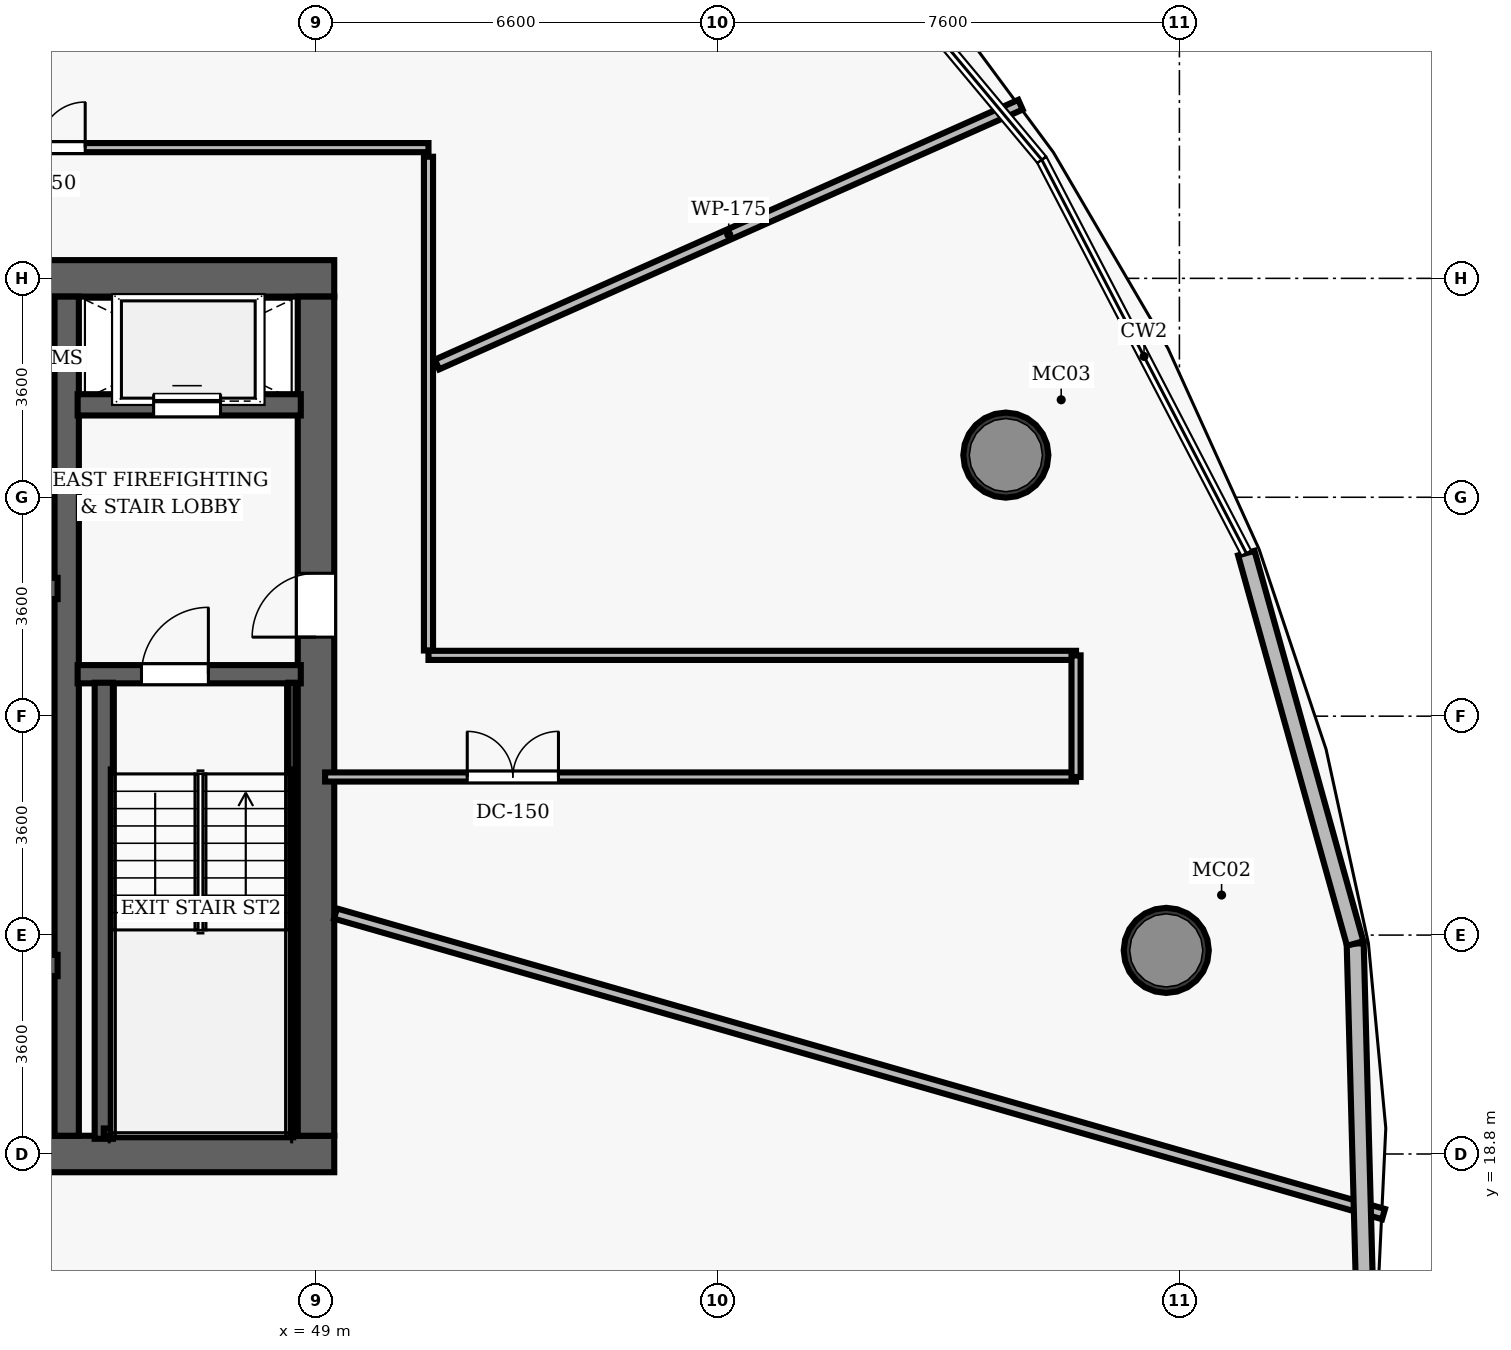
"""IFC4 building model, lengths in metres.
Left out: names, types, materials, properties, quantities, classifications, styles, units other than length and angle.
Written with IfcOpenShell. Run it as: python <this file> out.ifc"""

import sys

from ifc_helpers import new_model, si_unit, direction, frame, frame_2d, origin, origin_2d, place, context, subcontext, project, spatial, rectangle, hollow_circle, extrude, element, fill, save


model = new_model("IFC4")
c1 = context("Model", 3, precision=1e-05, world=origin(), true_north=direction((0.0, 1.0)))
c2 = subcontext(c1, "Body", "Model", "MODEL_VIEW")
j1 = project(units=[si_unit("LENGTHUNIT", "METRE"), si_unit("PLANEANGLEUNIT", "RADIAN")], contexts=[c1])
p1 = place(None, origin())
s1 = spatial("IfcSite", under=j1, at=p1, CompositionType="ELEMENT")
p2 = place(p1, origin())
s2 = spatial("IfcBuilding", under=s1, at=p2, CompositionType="ELEMENT")
p3 = place(p2, frame((0.0, 0.0, 144.8)))
s3 = spatial("IfcBuildingStorey", under=s2, at=p3, CompositionType="ELEMENT", Elevation=144.8)
p4 = place(p3, frame((26.7, 18.8, 0.0), z_axis=(0.0, 0.0, 1.0), x_axis=(1.0, 0.0, 0.0)))
e1 = element("IfcWall", 1, at=p4, inside=s3, PredefinedType="SHEAR", context=c2, shape_type="SweptSolid", body=[
    extrude(rectangle(XDim=22.6, YDim=0.6, at=frame_2d((11.3, 0.0))), origin(), (0.0, 0.0, 1.0), 3.5),
])
p5 = place(p4, frame((14.52, 0.0, 0.0)))
e2 = element("IfcOpeningElement", 2, at=p5, cuts=e1, PredefinedType="OPENING", context=c2, shape_type="SweptSolid", body=[
    extrude(rectangle(XDim=1.05, YDim=2.15, at=frame_2d((0.525, 1.075))), frame((0.0, 0.31, 0.0), z_axis=(0.0, -1.0, 0.0), x_axis=(1.0, 0.0, 0.0)), (0.0, 0.0, 1.0), 0.62),
])
p6 = place(p3, frame((26.7, 33.2, 0.0), z_axis=(0.0, 0.0, 1.0), x_axis=(1.0, 0.0, 0.0)))
e3 = element("IfcWall", 3, at=p6, inside=s3, PredefinedType="SHEAR", context=c2, shape_type="SweptSolid", body=[
    extrude(rectangle(XDim=22.6, YDim=0.6, at=frame_2d((11.3, 0.0))), origin(), (0.0, 0.0, 1.0), 3.5),
])
p7 = place(p6, frame((4.62, 0.0, 0.0)))
e4 = element("IfcOpeningElement", 4, at=p7, cuts=e3, PredefinedType="OPENING", context=c2, shape_type="SweptSolid", body=[
    extrude(rectangle(XDim=1.05, YDim=2.15, at=frame_2d((0.525, 1.075))), frame((0.0, 0.31, 0.0), z_axis=(0.0, -1.0, 0.0), x_axis=(1.0, 0.0, 0.0)), (0.0, 0.0, 1.0), 0.62),
])
p8 = place(p6, frame((14.52, 0.0, 0.0)))
e5 = element("IfcOpeningElement", 5, at=p8, cuts=e3, PredefinedType="OPENING", context=c2, shape_type="SweptSolid", body=[
    extrude(rectangle(XDim=1.05, YDim=2.15, at=frame_2d((0.525, 1.075))), frame((0.0, 0.31, 0.0), z_axis=(0.0, -1.0, 0.0), x_axis=(1.0, 0.0, 0.0)), (0.0, 0.0, 1.0), 0.62),
])
p9 = place(p3, frame((49.0, 19.1, 0.0), z_axis=(0.0, 0.0, 1.0), x_axis=(0.0, 1.0, 0.0)))
e6 = element("IfcWall", 6, at=p9, inside=s3, PredefinedType="SHEAR", context=c2, shape_type="SweptSolid", body=[
    extrude(rectangle(XDim=13.8, YDim=0.6, at=frame_2d((6.9, 0.0))), origin(), (0.0, 0.0, 1.0), 3.5),
])
p10 = place(p9, frame((8.2, 0.0, 0.0)))
e7 = element("IfcOpeningElement", 7, at=p10, cuts=e6, PredefinedType="OPENING", context=c2, shape_type="SweptSolid", body=[
    extrude(rectangle(XDim=1.05, YDim=2.15, at=frame_2d((0.525, 1.075))), frame((0.0, 0.31, 0.0), z_axis=(0.0, -1.0, 0.0), x_axis=(1.0, 0.0, 0.0)), (0.0, 0.0, 1.0), 0.62),
])
p11 = place(p3, frame((44.9, 19.1, 0.0), z_axis=(0.0, 0.0, 1.0), x_axis=(0.0, 1.0, 0.0)))
e8 = element("IfcWall", 8, at=p11, inside=s3, PredefinedType="SHEAR", context=c2, shape_type="SweptSolid", body=[
    extrude(rectangle(XDim=13.8, YDim=0.4, at=frame_2d((6.9, 0.0))), origin(), (0.0, 0.0, 1.0), 3.5),
])
for number, where, z_axis, x_axis in (
    (9, (62.984, 22.148, 0.0), (0.0, 0.0, 1.0), (1.0, 0.0, 0.0)),
    (10, (60.346, 30.293, 0.0), (0.0, 0.0, 1.0), (1.0, 0.0, 0.0)),
):
    element("IfcColumn", number, at=place(p3, frame(where, z_axis=z_axis, x_axis=x_axis)), inside=s3, PredefinedType="COLUMN", context=c2, shape_type="SweptSolid", body=[
        extrude(hollow_circle(Radius=0.7, WallThickness=0.055, at=origin_2d()), origin(), (0.0, 0.0, 1.0), 3.5),
    ])
p12 = place(p3, frame((45.08, 26.69, 0.0), z_axis=(0.0, 0.0, 1.0), x_axis=(1.0, 0.0, 0.0)))
e11 = element("IfcWall", 11, at=p12, inside=s3, PredefinedType="SHEAR", context=c2, shape_type="SweptSolid", body=[
    extrude(rectangle(XDim=3.67, YDim=0.3, at=frame_2d((1.835, 0.0))), origin(), (0.0, 0.0, 1.0), 3.5),
])
p13 = place(p12, frame((1.05, 0.0, 0.0)))
e12 = element("IfcOpeningElement", 12, at=p13, cuts=e11, PredefinedType="OPENING", context=c2, shape_type="SweptSolid", body=[
    extrude(rectangle(XDim=1.1, YDim=2.15, at=frame_2d((0.55, 1.075))), frame((0.0, 0.16, 0.0), z_axis=(0.0, -1.0, 0.0), x_axis=(1.0, 0.0, 0.0)), (0.0, 0.0, 1.0), 0.32),
])
p14 = place(p3, frame((45.51, 19.05, 0.0), z_axis=(0.0, 0.0, 1.0), x_axis=(0.0, 1.0, 0.0)))
e13 = element("IfcWall", 13, at=p14, inside=s3, PredefinedType="SHEAR", context=c2, shape_type="SweptSolid", body=[
    extrude(rectangle(XDim=7.5, YDim=0.3, at=frame_2d((3.75, 0.0))), origin(), (0.0, 0.0, 1.0), 3.5),
])
p15 = place(p3, frame((48.605, 19.1, 0.0), z_axis=(0.0, 0.0, 1.0), x_axis=(0.0, 1.0, 0.0)))
e14 = element("IfcWall", 14, at=p15, inside=s3, PredefinedType="SHEAR", context=c2, shape_type="SweptSolid", body=[
    extrude(rectangle(XDim=7.45, YDim=0.12, at=frame_2d((3.725, 0.0))), origin(), (0.0, 0.0, 1.0), 3.5),
])
p16 = place(p3, frame((45.51, 19.16, 0.0), z_axis=(0.0, 0.0, 1.0), x_axis=(1.0, 0.0, 0.0)))
e15 = element("IfcWall", 15, at=p16, inside=s3, PredefinedType="SHEAR", context=c2, shape_type="SweptSolid", body=[
    extrude(rectangle(XDim=3.095, YDim=0.12, at=frame_2d((1.547, 0.0))), origin(), (0.0, 0.0, 1.0), 3.5),
])
p17 = place(p3, frame((45.08, 31.12, 0.0), z_axis=(0.0, 0.0, 1.0), x_axis=(1.0, 0.0, 0.0)))
e16 = element("IfcWall", 16, at=p17, inside=s3, PredefinedType="SHEAR", context=c2, shape_type="SweptSolid", body=[
    extrude(rectangle(XDim=3.67, YDim=0.35, at=frame_2d((1.835, 0.0))), origin(), (0.0, 0.0, 1.0), 2.675),
])
p18 = place(p17, frame((1.25, 0.0, 0.0)))
e17 = element("IfcOpeningElement", 17, at=p18, cuts=e16, PredefinedType="OPENING", context=c2, shape_type="SweptSolid", body=[
    extrude(rectangle(XDim=1.1, YDim=2.15, at=frame_2d((0.55, 1.075))), frame((0.0, 0.185, 0.0), z_axis=(0.0, -1.0, 0.0), x_axis=(1.0, 0.0, 0.0)), (0.0, 0.0, 1.0), 0.37),
])
for number, where, z_axis, x_axis in (
    (18, (42.72, 21.9, 0.0), (0.0, 0.0, 1.0), (1.0, 0.0, 0.0)),
    (19, (42.72, 28.1, 0.0), (0.0, 0.0, 1.0), (1.0, 0.0, 0.0)),
):
    element("IfcWall", number, at=place(p3, frame(where, z_axis=z_axis, x_axis=x_axis)), inside=s3, PredefinedType="SHEAR", context=c2, shape_type="SweptSolid", body=[
        extrude(rectangle(XDim=2.03, YDim=0.35, at=frame_2d((1.015, 0.0))), origin(), (0.0, 0.0, 1.0), 2.675),
    ])
p19 = place(p3, frame((24.85, 35.35, 0.0), z_axis=(0.0, 0.0, 1.0), x_axis=(1.0, 0.0, 0.0)))
e20 = element("IfcWall", 20, at=p19, inside=s3, PredefinedType="PARTITIONING", context=c2, shape_type="SweptSolid", body=[
    extrude(rectangle(XDim=26.0, YDim=0.15, at=frame_2d((13.0, 0.0))), origin(), (0.0, 0.0, 1.0), 2.675),
])
p20 = place(p19, frame((18.854, 0.0, 0.0)))
e21 = element("IfcOpeningElement", 21, at=p20, cuts=e20, PredefinedType="OPENING", context=c2, shape_type="SweptSolid", body=[
    extrude(rectangle(XDim=1.5, YDim=2.2, at=frame_2d((0.75, 1.1))), frame((0.0, 0.085, 0.0), z_axis=(0.0, -1.0, 0.0), x_axis=(1.0, 0.0, 0.0)), (0.0, 0.0, 1.0), 0.17),
])
p21 = place(p19, frame((11.636, 0.0, 0.0)))
e22 = element("IfcOpeningElement", 22, at=p21, cuts=e20, PredefinedType="OPENING", context=c2, shape_type="SweptSolid", body=[
    extrude(rectangle(XDim=1.5, YDim=2.2, at=frame_2d((0.75, 1.1))), frame((0.0, 0.085, 0.0), z_axis=(0.0, -1.0, 0.0), x_axis=(1.0, 0.0, 0.0)), (0.0, 0.0, 1.0), 0.17),
])
p22 = place(p19, frame((6.73, 0.0, 0.0)))
e23 = element("IfcOpeningElement", 23, at=p22, cuts=e20, PredefinedType="OPENING", context=c2, shape_type="SweptSolid", body=[
    extrude(rectangle(XDim=0.95, YDim=2.15, at=frame_2d((0.475, 1.075))), frame((0.0, 0.085, 0.0), z_axis=(0.0, -1.0, 0.0), x_axis=(1.0, 0.0, 0.0)), (0.0, 0.0, 1.0), 0.17),
])
p23 = place(p3, frame((50.85, 27.08, 0.0), z_axis=(0.0, 0.0, 1.0), x_axis=(0.0, 1.0, 0.0)))
e24 = element("IfcWall", 24, at=p23, inside=s3, PredefinedType="PARTITIONING", context=c2, shape_type="SweptSolid", body=[
    extrude(rectangle(XDim=8.12, YDim=0.15, at=frame_2d((4.06, 0.0))), origin(), (0.0, 0.0, 1.0), 2.675),
])
p24 = place(p3, frame((50.85, 27.0, 0.0), z_axis=(0.0, 0.0, 1.0), x_axis=(1.0, 0.0, 0.0)))
e25 = element("IfcWall", 25, at=p24, inside=s3, PredefinedType="PARTITIONING", context=c2, shape_type="SweptSolid", body=[
    extrude(rectangle(XDim=10.65, YDim=0.15, at=frame_2d((5.325, 0.0))), origin(), (0.0, 0.0, 1.0), 2.675),
])
p25 = place(p3, frame((49.15, 25.0, 0.0), z_axis=(0.0, 0.0, 1.0), x_axis=(1.0, 0.0, 0.0)))
e26 = element("IfcWall", 26, at=p25, inside=s3, PredefinedType="PARTITIONING", context=c2, shape_type="SweptSolid", body=[
    extrude(rectangle(XDim=12.35, YDim=0.15, at=frame_2d((6.175, 0.0))), origin(), (0.0, 0.0, 1.0), 2.675),
])
p26 = place(p25, frame((2.337, 0.0, 0.0)))
e27 = element("IfcOpeningElement", 27, at=p26, cuts=e26, PredefinedType="OPENING", context=c2, shape_type="SweptSolid", body=[
    extrude(rectangle(XDim=1.5, YDim=2.2, at=frame_2d((0.75, 1.1))), frame((0.0, 0.085, 0.0), z_axis=(0.0, -1.0, 0.0), x_axis=(1.0, 0.0, 0.0)), (0.0, 0.0, 1.0), 0.17),
])
p27 = place(p3, frame((61.5, 25.0, 0.0), z_axis=(0.0, 0.0, 1.0), x_axis=(0.0, 1.0, 0.0)))
e28 = element("IfcWall", 28, at=p27, inside=s3, PredefinedType="PARTITIONING", context=c2, shape_type="SweptSolid", body=[
    extrude(rectangle(XDim=2.0, YDim=0.15, at=frame_2d((1.0, 0.0))), origin(), (0.0, 0.0, 1.0), 2.675),
])
p28 = place(p3, frame((50.99, 31.783, 0.0), z_axis=(0.0, 0.0, 1.0), x_axis=(0.913539137808, 0.406750837361, 0.0)))
e29 = element("IfcWall", 29, at=p28, inside=s3, PredefinedType="PARTITIONING", context=c2, shape_type="SweptSolid", body=[
    extrude(rectangle(XDim=10.504, YDim=0.175, at=frame_2d((5.252, 0.0))), origin(), (0.0, 0.0, 1.0), 2.675),
])
p29 = place(p3, frame((42.629, 35.49, 0.0), z_axis=(0.0, 0.0, 1.0), x_axis=(0.4383698995, 0.898794654642, 0.0)))
e30 = element("IfcWall", 30, at=p29, inside=s3, PredefinedType="PARTITIONING", context=c2, shape_type="SweptSolid", body=[
    extrude(rectangle(XDim=12.354, YDim=0.175, at=frame_2d((6.177, 0.0))), origin(), (0.0, 0.0, 1.0), 2.675),
])
p30 = place(p3, frame((43.072, 18.48, 0.0), z_axis=(0.0, 0.0, 1.0), x_axis=(0.559194878042, -0.829036240687, 0.0)))
e31 = element("IfcWall", 31, at=p30, inside=s3, PredefinedType="PARTITIONING", context=c2, shape_type="SweptSolid", body=[
    extrude(rectangle(XDim=18.556, YDim=0.175, at=frame_2d((9.278, 0.0))), origin(), (0.0, 0.0, 1.0), 2.675),
])
p31 = place(p3, frame((49.32, 22.754, 0.0), z_axis=(0.0, 0.0, 1.0), x_axis=(0.961264573676, -0.275627319757, 0.0)))
e32 = element("IfcWall", 32, at=p31, inside=s3, PredefinedType="PARTITIONING", context=c2, shape_type="SweptSolid", body=[
    extrude(rectangle(XDim=17.931, YDim=0.175, at=frame_2d((8.966, 0.0))), origin(), (0.0, 0.0, 1.0), 2.675),
])
p32 = place(p3, frame((66.091, 22.261, 0.0), z_axis=(0.0, 0.0, 1.0), x_axis=(0.026918642547, -0.999637627685, 0.0)))
e33 = element("IfcWall", 33, at=p32, inside=s3, PredefinedType="SOLIDWALL", context=c2, shape_type="SweptSolid", body=[
    extrude(rectangle(XDim=5.823, YDim=0.28, at=frame_2d((2.911, 0.0))), origin(), (0.0, 0.0, 1.0), 3.26),
])
p33 = place(p3, frame((64.3, 28.681, 0.0), z_axis=(0.0, 0.0, 1.0), x_axis=(0.268682789377, -0.963228715671, 0.0)))
e34 = element("IfcWall", 34, at=p33, inside=s3, PredefinedType="SOLIDWALL", context=c2, shape_type="SweptSolid", body=[
    extrude(rectangle(XDim=6.665, YDim=0.28, at=frame_2d((3.333, 0.0))), origin(), (0.0, 0.0, 1.0), 3.26),
])
p34 = place(p13, origin())
e35 = element("IfcDoor", 35, at=p34, inside=s3, OperationType="SINGLE_SWING_RIGHT", PredefinedType="DOOR", context=c2, shape_type="SweptSolid", body=[
    extrude(rectangle(XDim=1.1, YDim=2.15, at=frame_2d((0.55, 1.075))), frame((0.0, 0.025, 0.0), z_axis=(0.0, -1.0, 0.0), x_axis=(1.0, 0.0, 0.0)), (0.0, 0.0, 1.0), 0.05),
])
fill(e12, e35)
p35 = place(p10, origin())
e36 = element("IfcDoor", 36, at=p35, inside=s3, OperationType="SINGLE_SWING_LEFT", PredefinedType="DOOR", context=c2, shape_type="SweptSolid", body=[
    extrude(rectangle(XDim=1.05, YDim=2.15, at=frame_2d((0.525, 1.075))), frame((0.0, 0.025, 0.0), z_axis=(0.0, -1.0, 0.0), x_axis=(1.0, 0.0, 0.0)), (0.0, 0.0, 1.0), 0.05),
])
fill(e7, e36)
p36 = place(p20, origin())
e37 = element("IfcDoor", 37, at=p36, inside=s3, OperationType="DOUBLE_DOOR_SINGLE_SWING", PredefinedType="DOOR", context=c2, shape_type="SweptSolid", body=[
    extrude(rectangle(XDim=1.5, YDim=2.2, at=frame_2d((0.75, 1.1))), frame((0.0, 0.025, 0.0), z_axis=(0.0, -1.0, 0.0), x_axis=(1.0, 0.0, 0.0)), (0.0, 0.0, 1.0), 0.05),
])
fill(e21, e37)
p37 = place(p26, origin())
e38 = element("IfcDoor", 38, at=p37, inside=s3, OperationType="DOUBLE_DOOR_SINGLE_SWING", PredefinedType="DOOR", context=c2, shape_type="SweptSolid", body=[
    extrude(rectangle(XDim=1.5, YDim=2.2, at=frame_2d((0.75, 1.1))), frame((0.0, 0.025, 0.0), z_axis=(0.0, -1.0, 0.0), x_axis=(1.0, 0.0, 0.0)), (0.0, 0.0, 1.0), 0.05),
])
fill(e27, e38)
p38 = place(p18, origin())
e39 = element("IfcDoor", 39, at=p38, inside=s3, OperationType="SLIDING_TO_LEFT", PredefinedType="DOOR", context=c2, shape_type="SweptSolid", body=[
    extrude(rectangle(XDim=1.1, YDim=2.15, at=frame_2d((0.55, 1.075))), frame((0.0, 0.025, 0.0), z_axis=(0.0, -1.0, 0.0), x_axis=(1.0, 0.0, 0.0)), (0.0, 0.0, 1.0), 0.05),
])
fill(e17, e39)
save(model, sys.argv[1])
